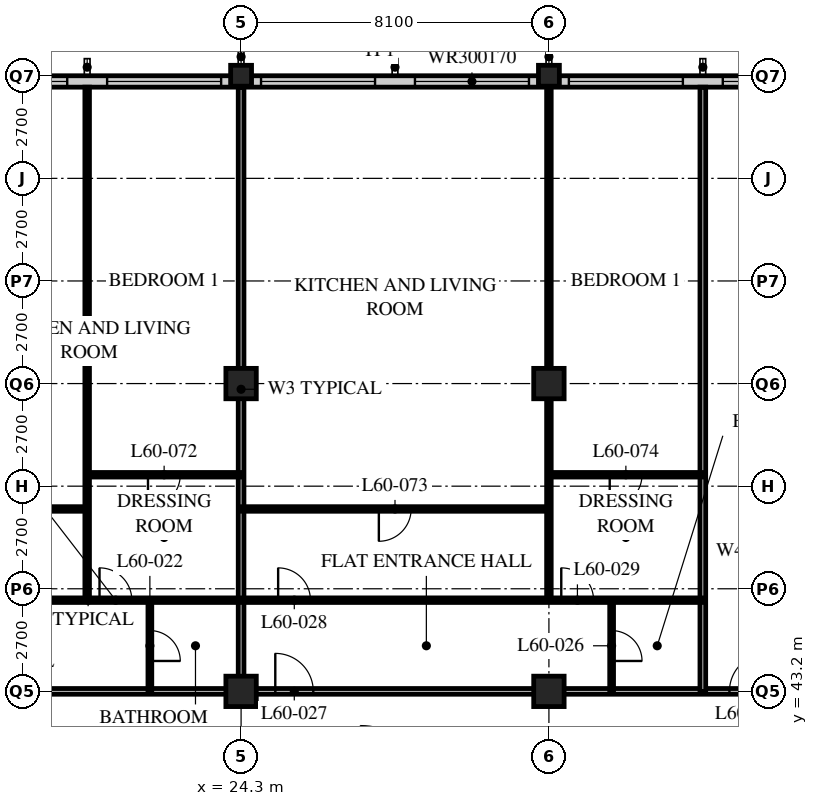
"""IFC4 building model, lengths in metres.
Left out: names, types, materials, properties, quantities, classifications, styles, units other than length and angle.
Written with IfcOpenShell. Run it as: python <this file> out.ifc"""

import sys

from ifc_helpers import new_model, si_unit, direction, frame, frame_2d, origin, origin_2d, place, context, subcontext, project, spatial, rectangle, hollow_rectangle, extrude, element, fill, save


model = new_model("IFC4")
c1 = context("Model", 3, precision=1e-05, world=origin(), true_north=direction((0.0, 1.0)))
c2 = subcontext(c1, "Body", "Model", "MODEL_VIEW")
j1 = project(units=[si_unit("LENGTHUNIT", "METRE"), si_unit("PLANEANGLEUNIT", "RADIAN")], contexts=[c1])
p1 = place(None, origin())
s1 = spatial("IfcSite", under=j1, at=p1, CompositionType="ELEMENT")
p2 = place(p1, origin())
s2 = spatial("IfcBuilding", under=s1, at=p2, CompositionType="ELEMENT")
p3 = place(p2, frame((0.0, 0.0, 231.6)))
s3 = spatial("IfcBuildingStorey", under=s2, at=p3, CompositionType="ELEMENT", Elevation=231.6)
for number, where, z_axis, x_axis in (
    (1, (24.3, 43.2, 0.0), (0.0, 0.0, 1.0), (1.0, 0.0, 0.0)),
    (2, (24.3, 51.3, 0.0), (0.0, 0.0, 1.0), (1.0, 0.0, 0.0)),
):
    element("IfcColumn", number, at=place(p3, frame(where, z_axis=z_axis, x_axis=x_axis)), inside=s3, PredefinedType="COLUMN", context=c2, shape_type="SweptSolid", body=[
        extrude(hollow_rectangle(XDim=0.8, YDim=0.8, WallThickness=0.08, at=origin_2d()), origin(), (0.0, 0.0, 1.0), 3.6),
    ])
p4 = place(p3, frame((24.3, 59.4, 0.0), z_axis=(0.0, 0.0, 1.0), x_axis=(1.0, 0.0, 0.0)))
e3 = element("IfcColumn", 3, at=p4, inside=s3, PredefinedType="COLUMN", context=c2, shape_type="SweptSolid", body=[
    extrude(hollow_rectangle(XDim=0.55, YDim=0.55, WallThickness=0.045, at=origin_2d()), origin(), (0.0, 0.0, 1.0), 3.6),
])
for number, where, z_axis, x_axis in (
    (4, (32.4, 43.2, 0.0), (0.0, 0.0, 1.0), (1.0, 0.0, 0.0)),
    (5, (32.4, 51.3, 0.0), (0.0, 0.0, 1.0), (1.0, 0.0, 0.0)),
):
    element("IfcColumn", number, at=place(p3, frame(where, z_axis=z_axis, x_axis=x_axis)), inside=s3, PredefinedType="COLUMN", context=c2, shape_type="SweptSolid", body=[
        extrude(hollow_rectangle(XDim=0.8, YDim=0.8, WallThickness=0.08, at=origin_2d()), origin(), (0.0, 0.0, 1.0), 3.6),
    ])
p5 = place(p3, frame((32.4, 59.4, 0.0), z_axis=(0.0, 0.0, 1.0), x_axis=(1.0, 0.0, 0.0)))
e6 = element("IfcColumn", 6, at=p5, inside=s3, PredefinedType="COLUMN", context=c2, shape_type="SweptSolid", body=[
    extrude(hollow_rectangle(XDim=0.55, YDim=0.55, WallThickness=0.045, at=origin_2d()), origin(), (0.0, 0.0, 1.0), 3.6),
])
p6 = place(p3, frame((48.3, 59.25, 0.0), z_axis=(0.0, 0.0, 1.0), x_axis=(-1.0, 0.0, 0.0)))
e7 = element("IfcWall", 7, at=p6, inside=s3, PredefinedType="SOLIDWALL", context=c2, shape_type="SweptSolid", body=[
    extrude(rectangle(XDim=40.2, YDim=0.3, at=frame_2d((20.1, 0.0))), origin(), (0.0, 0.0, 1.0), 2.35),
])
p7 = place(p6, frame((0.225, 0.0, 0.6)))
e8 = element("IfcOpeningElement", 8, at=p7, cuts=e7, PredefinedType="OPENING", context=c2, shape_type="SweptSolid", body=[
    extrude(rectangle(XDim=3.0, YDim=1.7, at=frame_2d((1.5, 0.85))), frame((0.0, 0.16, 0.0), z_axis=(0.0, -1.0, 0.0), x_axis=(1.0, 0.0, 0.0)), (0.0, 0.0, 1.0), 0.32),
])
p8 = place(p6, frame((4.275, 0.0, 0.6)))
e9 = element("IfcOpeningElement", 9, at=p8, cuts=e7, PredefinedType="OPENING", context=c2, shape_type="SweptSolid", body=[
    extrude(rectangle(XDim=3.0, YDim=1.7, at=frame_2d((1.5, 0.85))), frame((0.0, 0.16, 0.0), z_axis=(0.0, -1.0, 0.0), x_axis=(1.0, 0.0, 0.0)), (0.0, 0.0, 1.0), 0.32),
])
p9 = place(p6, frame((8.325, 0.0, 0.6)))
e10 = element("IfcOpeningElement", 10, at=p9, cuts=e7, PredefinedType="OPENING", context=c2, shape_type="SweptSolid", body=[
    extrude(rectangle(XDim=3.0, YDim=1.7, at=frame_2d((1.5, 0.85))), frame((0.0, 0.16, 0.0), z_axis=(0.0, -1.0, 0.0), x_axis=(1.0, 0.0, 0.0)), (0.0, 0.0, 1.0), 0.32),
])
p10 = place(p6, frame((12.375, 0.0, 0.6)))
e11 = element("IfcOpeningElement", 11, at=p10, cuts=e7, PredefinedType="OPENING", context=c2, shape_type="SweptSolid", body=[
    extrude(rectangle(XDim=3.0, YDim=1.7, at=frame_2d((1.5, 0.85))), frame((0.0, 0.16, 0.0), z_axis=(0.0, -1.0, 0.0), x_axis=(1.0, 0.0, 0.0)), (0.0, 0.0, 1.0), 0.32),
])
p11 = place(p6, frame((16.425, 0.0, 0.6)))
e12 = element("IfcOpeningElement", 12, at=p11, cuts=e7, PredefinedType="OPENING", context=c2, shape_type="SweptSolid", body=[
    extrude(rectangle(XDim=3.0, YDim=1.7, at=frame_2d((1.5, 0.85))), frame((0.0, 0.16, 0.0), z_axis=(0.0, -1.0, 0.0), x_axis=(1.0, 0.0, 0.0)), (0.0, 0.0, 1.0), 0.32),
])
p12 = place(p6, frame((20.475, 0.0, 0.6)))
e13 = element("IfcOpeningElement", 13, at=p12, cuts=e7, PredefinedType="OPENING", context=c2, shape_type="SweptSolid", body=[
    extrude(rectangle(XDim=3.0, YDim=1.7, at=frame_2d((1.5, 0.85))), frame((0.0, 0.16, 0.0), z_axis=(0.0, -1.0, 0.0), x_axis=(1.0, 0.0, 0.0)), (0.0, 0.0, 1.0), 0.32),
])
p13 = place(p6, frame((24.525, 0.0, 0.6)))
e14 = element("IfcOpeningElement", 14, at=p13, cuts=e7, PredefinedType="OPENING", context=c2, shape_type="SweptSolid", body=[
    extrude(rectangle(XDim=3.0, YDim=1.7, at=frame_2d((1.5, 0.85))), frame((0.0, 0.16, 0.0), z_axis=(0.0, -1.0, 0.0), x_axis=(1.0, 0.0, 0.0)), (0.0, 0.0, 1.0), 0.32),
])
p14 = place(p6, frame((28.575, 0.0, 0.6)))
e15 = element("IfcOpeningElement", 15, at=p14, cuts=e7, PredefinedType="OPENING", context=c2, shape_type="SweptSolid", body=[
    extrude(rectangle(XDim=3.0, YDim=1.7, at=frame_2d((1.5, 0.85))), frame((0.0, 0.16, 0.0), z_axis=(0.0, -1.0, 0.0), x_axis=(1.0, 0.0, 0.0)), (0.0, 0.0, 1.0), 0.32),
])
p15 = place(p6, frame((32.625, 0.0, 0.6)))
e16 = element("IfcOpeningElement", 16, at=p15, cuts=e7, PredefinedType="OPENING", context=c2, shape_type="SweptSolid", body=[
    extrude(rectangle(XDim=3.0, YDim=1.7, at=frame_2d((1.5, 0.85))), frame((0.0, 0.16, 0.0), z_axis=(0.0, -1.0, 0.0), x_axis=(1.0, 0.0, 0.0)), (0.0, 0.0, 1.0), 0.32),
])
p16 = place(p6, frame((36.675, 0.0, 0.6)))
e17 = element("IfcOpeningElement", 17, at=p16, cuts=e7, PredefinedType="OPENING", context=c2, shape_type="SweptSolid", body=[
    extrude(rectangle(XDim=3.0, YDim=1.7, at=frame_2d((1.5, 0.85))), frame((0.0, 0.16, 0.0), z_axis=(0.0, -1.0, 0.0), x_axis=(1.0, 0.0, 0.0)), (0.0, 0.0, 1.0), 0.32),
])
p17 = place(p3, frame((8.1, 43.2, 0.0), z_axis=(0.0, 0.0, 1.0), x_axis=(1.0, 0.0, 0.0)))
e18 = element("IfcWall", 18, at=p17, inside=s3, PredefinedType="PARTITIONING", context=c2, shape_type="SweptSolid", body=[
    extrude(rectangle(XDim=36.45, YDim=0.15, at=frame_2d((18.225, 0.0))), origin(), (0.0, 0.0, 1.0), 2.35),
])
p18 = place(p17, frame((4.45, 0.0, 0.0)))
e19 = element("IfcOpeningElement", 19, at=p18, cuts=e18, PredefinedType="OPENING", context=c2, shape_type="SweptSolid", body=[
    extrude(rectangle(XDim=1.0, YDim=2.1, at=frame_2d((0.5, 1.05))), frame((0.0, 0.085, 0.0), z_axis=(0.0, -1.0, 0.0), x_axis=(1.0, 0.0, 0.0)), (0.0, 0.0, 1.0), 0.17),
])
p19 = place(p17, frame((17.1, 0.0, 0.0)))
e20 = element("IfcOpeningElement", 20, at=p19, cuts=e18, PredefinedType="OPENING", context=c2, shape_type="SweptSolid", body=[
    extrude(rectangle(XDim=1.0, YDim=2.1, at=frame_2d((0.5, 1.05))), frame((0.0, 0.085, 0.0), z_axis=(0.0, -1.0, 0.0), x_axis=(1.0, 0.0, 0.0)), (0.0, 0.0, 1.0), 0.17),
])
p20 = place(p17, frame((29.05, 0.0, 0.0)))
e21 = element("IfcOpeningElement", 21, at=p20, cuts=e18, PredefinedType="OPENING", context=c2, shape_type="SweptSolid", body=[
    extrude(rectangle(XDim=1.0, YDim=2.1, at=frame_2d((0.5, 1.05))), frame((0.0, 0.085, 0.0), z_axis=(0.0, -1.0, 0.0), x_axis=(1.0, 0.0, 0.0)), (0.0, 0.0, 1.0), 0.17),
])
p21 = place(p17, frame((33.925, 0.0, 0.0)))
e22 = element("IfcOpeningElement", 22, at=p21, cuts=e18, PredefinedType="OPENING", context=c2, shape_type="SweptSolid", body=[
    extrude(rectangle(XDim=1.0, YDim=2.1, at=frame_2d((0.5, 1.05))), frame((0.0, 0.085, 0.0), z_axis=(0.0, -1.0, 0.0), x_axis=(1.0, 0.0, 0.0)), (0.0, 0.0, 1.0), 0.17),
])
p22 = place(p17, frame((1.525, 0.0, 0.0)))
e23 = element("IfcOpeningElement", 23, at=p22, cuts=e18, PredefinedType="OPENING", context=c2, shape_type="SweptSolid", body=[
    extrude(rectangle(XDim=1.0, YDim=2.1, at=frame_2d((0.5, 1.05))), frame((0.0, 0.085, 0.0), z_axis=(0.0, -1.0, 0.0), x_axis=(1.0, 0.0, 0.0)), (0.0, 0.0, 1.0), 0.17),
])
p23 = place(p3, frame((21.9, 43.2, 0.0), z_axis=(0.0, 0.0, 1.0), x_axis=(0.0, 1.0, 0.0)))
e24 = element("IfcWall", 24, at=p23, inside=s3, PredefinedType="PARTITIONING", context=c2, shape_type="SweptSolid", body=[
    extrude(rectangle(XDim=2.4, YDim=0.1, at=frame_2d((1.2, 0.0))), origin(), (0.0, 0.0, 1.0), 3.35),
])
p24 = place(p23, frame((0.8, 0.0, 0.0)))
e25 = element("IfcOpeningElement", 25, at=p24, cuts=e24, PredefinedType="OPENING", context=c2, shape_type="SweptSolid", body=[
    extrude(rectangle(XDim=0.8, YDim=2.1, at=frame_2d((0.4, 1.05))), frame((0.0, 0.06, 0.0), z_axis=(0.0, -1.0, 0.0), x_axis=(1.0, 0.0, 0.0)), (0.0, 0.0, 1.0), 0.12),
])
p25 = place(p3, frame((20.25, 45.6, 0.0), z_axis=(0.0, 0.0, 1.0), x_axis=(0.0, 1.0, 0.0)))
e26 = element("IfcWall", 26, at=p25, inside=s3, PredefinedType="PARTITIONING", context=c2, shape_type="SweptSolid", body=[
    extrude(rectangle(XDim=13.5, YDim=0.12, at=frame_2d((6.75, 0.0))), origin(), (0.0, 0.0, 1.0), 3.35),
])
p26 = place(p3, frame((24.3, 43.2, 0.0), z_axis=(0.0, 0.0, 1.0), x_axis=(0.0, 1.0, 0.0)))
e27 = element("IfcWall", 27, at=p26, inside=s3, PredefinedType="PARTITIONING", context=c2, shape_type="SweptSolid", body=[
    extrude(rectangle(XDim=15.9, YDim=0.15, at=frame_2d((7.95, 0.0))), origin(), (0.0, 0.0, 1.0), 2.35),
])
p27 = place(p3, frame((34.05, 43.2, 0.0), z_axis=(0.0, 0.0, 1.0), x_axis=(0.0, 1.0, 0.0)))
e28 = element("IfcWall", 28, at=p27, inside=s3, PredefinedType="PARTITIONING", context=c2, shape_type="SweptSolid", body=[
    extrude(rectangle(XDim=2.4, YDim=0.1, at=frame_2d((1.2, 0.0))), origin(), (0.0, 0.0, 1.0), 3.35),
])
p28 = place(p27, frame((0.8, 0.0, 0.0)))
e29 = element("IfcOpeningElement", 29, at=p28, cuts=e28, PredefinedType="OPENING", context=c2, shape_type="SweptSolid", body=[
    extrude(rectangle(XDim=0.8, YDim=2.1, at=frame_2d((0.4, 1.05))), frame((0.0, 0.06, 0.0), z_axis=(0.0, -1.0, 0.0), x_axis=(1.0, 0.0, 0.0)), (0.0, 0.0, 1.0), 0.12),
])
p29 = place(p3, frame((32.4, 45.6, 0.0), z_axis=(0.0, 0.0, 1.0), x_axis=(0.0, 1.0, 0.0)))
e30 = element("IfcWall", 30, at=p29, inside=s3, PredefinedType="PARTITIONING", context=c2, shape_type="SweptSolid", body=[
    extrude(rectangle(XDim=13.5, YDim=0.12, at=frame_2d((6.75, 0.0))), origin(), (0.0, 0.0, 1.0), 2.35),
])
p30 = place(p3, frame((36.45, 43.2, 0.0), z_axis=(0.0, 0.0, 1.0), x_axis=(0.0, 1.0, 0.0)))
e31 = element("IfcWall", 31, at=p30, inside=s3, PredefinedType="PARTITIONING", context=c2, shape_type="SweptSolid", body=[
    extrude(rectangle(XDim=15.9, YDim=0.15, at=frame_2d((7.95, 0.0))), origin(), (0.0, 0.0, 1.0), 3.35),
])
p31 = place(p3, frame((4.1, 45.6, 0.0), z_axis=(0.0, 0.0, 1.0), x_axis=(1.0, 0.0, 0.0)))
e32 = element("IfcWall", 32, at=p31, inside=s3, PredefinedType="PARTITIONING", context=c2, shape_type="SweptSolid", body=[
    extrude(rectangle(XDim=32.35, YDim=0.12, at=frame_2d((16.175, 0.0))), origin(), (0.0, 0.0, 1.0), 3.35),
])
p32 = place(p31, frame((9.025, 0.0, 0.0)))
e33 = element("IfcOpeningElement", 33, at=p32, cuts=e32, PredefinedType="OPENING", context=c2, shape_type="SweptSolid", body=[
    extrude(rectangle(XDim=0.85, YDim=2.1, at=frame_2d((0.425, 1.05))), frame((0.0, 0.07, 0.0), z_axis=(0.0, -1.0, 0.0), x_axis=(1.0, 0.0, 0.0)), (0.0, 0.0, 1.0), 0.14),
])
p33 = place(p31, frame((16.475, 0.0, 0.0)))
e34 = element("IfcOpeningElement", 34, at=p33, cuts=e32, PredefinedType="OPENING", context=c2, shape_type="SweptSolid", body=[
    extrude(rectangle(XDim=0.85, YDim=2.1, at=frame_2d((0.425, 1.05))), frame((0.0, 0.07, 0.0), z_axis=(0.0, -1.0, 0.0), x_axis=(1.0, 0.0, 0.0)), (0.0, 0.0, 1.0), 0.14),
])
p34 = place(p31, frame((21.175, 0.0, 0.0)))
e35 = element("IfcOpeningElement", 35, at=p34, cuts=e32, PredefinedType="OPENING", context=c2, shape_type="SweptSolid", body=[
    extrude(rectangle(XDim=0.85, YDim=2.1, at=frame_2d((0.425, 1.05))), frame((0.0, 0.07, 0.0), z_axis=(0.0, -1.0, 0.0), x_axis=(1.0, 0.0, 0.0)), (0.0, 0.0, 1.0), 0.14),
])
p35 = place(p31, frame((28.625, 0.0, 0.0)))
e36 = element("IfcOpeningElement", 36, at=p35, cuts=e32, PredefinedType="OPENING", context=c2, shape_type="SweptSolid", body=[
    extrude(rectangle(XDim=0.85, YDim=2.1, at=frame_2d((0.425, 1.05))), frame((0.0, 0.07, 0.0), z_axis=(0.0, -1.0, 0.0), x_axis=(1.0, 0.0, 0.0)), (0.0, 0.0, 1.0), 0.14),
])
p36 = place(p31, frame((6.725, 0.0, 0.0)))
e37 = element("IfcOpeningElement", 37, at=p36, cuts=e32, PredefinedType="OPENING", context=c2, shape_type="SweptSolid", body=[
    extrude(rectangle(XDim=0.85, YDim=2.1, at=frame_2d((0.425, 1.05))), frame((0.0, 0.07, 0.0), z_axis=(0.0, -1.0, 0.0), x_axis=(1.0, 0.0, 0.0)), (0.0, 0.0, 1.0), 0.14),
])
p37 = place(p31, frame((2.875, 0.0, 0.0)))
e38 = element("IfcOpeningElement", 38, at=p37, cuts=e32, PredefinedType="OPENING", context=c2, shape_type="SweptSolid", body=[
    extrude(rectangle(XDim=0.85, YDim=2.1, at=frame_2d((0.425, 1.05))), frame((0.0, 0.07, 0.0), z_axis=(0.0, -1.0, 0.0), x_axis=(1.0, 0.0, 0.0)), (0.0, 0.0, 1.0), 0.14),
])
p38 = place(p3, frame((12.15, 48.0, 0.0), z_axis=(0.0, 0.0, 1.0), x_axis=(1.0, 0.0, 0.0)))
e39 = element("IfcWall", 39, at=p38, inside=s3, PredefinedType="PARTITIONING", context=c2, shape_type="SweptSolid", body=[
    extrude(rectangle(XDim=8.1, YDim=0.12, at=frame_2d((4.05, 0.0))), origin(), (0.0, 0.0, 1.0), 3.35),
])
p39 = place(p38, frame((3.625, 0.0, 0.0)))
e40 = element("IfcOpeningElement", 40, at=p39, cuts=e39, PredefinedType="OPENING", context=c2, shape_type="SweptSolid", body=[
    extrude(rectangle(XDim=0.85, YDim=2.1, at=frame_2d((0.425, 1.05))), frame((0.0, 0.07, 0.0), z_axis=(0.0, -1.0, 0.0), x_axis=(1.0, 0.0, 0.0)), (0.0, 0.0, 1.0), 0.14),
])
p40 = place(p3, frame((20.25, 48.9, 0.0), z_axis=(0.0, 0.0, 1.0), x_axis=(1.0, 0.0, 0.0)))
e41 = element("IfcWall", 41, at=p40, inside=s3, PredefinedType="PARTITIONING", context=c2, shape_type="SweptSolid", body=[
    extrude(rectangle(XDim=4.05, YDim=0.12, at=frame_2d((2.025, 0.0))), origin(), (0.0, 0.0, 1.0), 3.35),
])
p41 = place(p40, frame((1.6, 0.0, 0.0)))
e42 = element("IfcOpeningElement", 42, at=p41, cuts=e41, PredefinedType="OPENING", context=c2, shape_type="SweptSolid", body=[
    extrude(rectangle(XDim=0.85, YDim=2.1, at=frame_2d((0.425, 1.05))), frame((0.0, 0.07, 0.0), z_axis=(0.0, -1.0, 0.0), x_axis=(1.0, 0.0, 0.0)), (0.0, 0.0, 1.0), 0.14),
])
p42 = place(p3, frame((24.3, 48.0, 0.0), z_axis=(0.0, 0.0, 1.0), x_axis=(1.0, 0.0, 0.0)))
e43 = element("IfcWall", 43, at=p42, inside=s3, PredefinedType="PARTITIONING", context=c2, shape_type="SweptSolid", body=[
    extrude(rectangle(XDim=8.1, YDim=0.12, at=frame_2d((4.05, 0.0))), origin(), (0.0, 0.0, 1.0), 3.35),
])
p43 = place(p42, frame((3.625, 0.0, 0.0)))
e44 = element("IfcOpeningElement", 44, at=p43, cuts=e43, PredefinedType="OPENING", context=c2, shape_type="SweptSolid", body=[
    extrude(rectangle(XDim=0.85, YDim=2.1, at=frame_2d((0.425, 1.05))), frame((0.0, 0.07, 0.0), z_axis=(0.0, -1.0, 0.0), x_axis=(1.0, 0.0, 0.0)), (0.0, 0.0, 1.0), 0.14),
])
p44 = place(p3, frame((32.4, 48.9, 0.0), z_axis=(0.0, 0.0, 1.0), x_axis=(1.0, 0.0, 0.0)))
e45 = element("IfcWall", 45, at=p44, inside=s3, PredefinedType="PARTITIONING", context=c2, shape_type="SweptSolid", body=[
    extrude(rectangle(XDim=4.05, YDim=0.12, at=frame_2d((2.025, 0.0))), origin(), (0.0, 0.0, 1.0), 3.35),
])
p45 = place(p44, frame((1.6, 0.0, 0.0)))
e46 = element("IfcOpeningElement", 46, at=p45, cuts=e45, PredefinedType="OPENING", context=c2, shape_type="SweptSolid", body=[
    extrude(rectangle(XDim=0.85, YDim=2.1, at=frame_2d((0.425, 1.05))), frame((0.0, 0.07, 0.0), z_axis=(0.0, -1.0, 0.0), x_axis=(1.0, 0.0, 0.0)), (0.0, 0.0, 1.0), 0.14),
])
p46 = place(p9, origin())
e47 = element("IfcWindow", 47, at=p46, inside=s3, PartitioningType="SINGLE_PANEL", PredefinedType="WINDOW", context=c2, shape_type="SweptSolid", body=[
    extrude(rectangle(XDim=3.0, YDim=1.7, at=frame_2d((1.5, 0.85))), frame((0.0, 0.03, 0.0), z_axis=(0.0, -1.0, 0.0), x_axis=(1.0, 0.0, 0.0)), (0.0, 0.0, 1.0), 0.06),
])
fill(e10, e47)
p47 = place(p10, origin())
e48 = element("IfcWindow", 48, at=p47, inside=s3, PartitioningType="SINGLE_PANEL", PredefinedType="WINDOW", context=c2, shape_type="SweptSolid", body=[
    extrude(rectangle(XDim=3.0, YDim=1.7, at=frame_2d((1.5, 0.85))), frame((0.0, 0.03, 0.0), z_axis=(0.0, -1.0, 0.0), x_axis=(1.0, 0.0, 0.0)), (0.0, 0.0, 1.0), 0.06),
])
fill(e11, e48)
p48 = place(p11, origin())
e49 = element("IfcWindow", 49, at=p48, inside=s3, PartitioningType="SINGLE_PANEL", PredefinedType="WINDOW", context=c2, shape_type="SweptSolid", body=[
    extrude(rectangle(XDim=3.0, YDim=1.7, at=frame_2d((1.5, 0.85))), frame((0.0, 0.03, 0.0), z_axis=(0.0, -1.0, 0.0), x_axis=(1.0, 0.0, 0.0)), (0.0, 0.0, 1.0), 0.06),
])
fill(e12, e49)
p49 = place(p12, origin())
e50 = element("IfcWindow", 50, at=p49, inside=s3, PartitioningType="SINGLE_PANEL", PredefinedType="WINDOW", context=c2, shape_type="SweptSolid", body=[
    extrude(rectangle(XDim=3.0, YDim=1.7, at=frame_2d((1.5, 0.85))), frame((0.0, 0.03, 0.0), z_axis=(0.0, -1.0, 0.0), x_axis=(1.0, 0.0, 0.0)), (0.0, 0.0, 1.0), 0.06),
])
fill(e13, e50)
p50 = place(p13, origin())
e51 = element("IfcWindow", 51, at=p50, inside=s3, PartitioningType="SINGLE_PANEL", PredefinedType="WINDOW", context=c2, shape_type="SweptSolid", body=[
    extrude(rectangle(XDim=3.0, YDim=1.7, at=frame_2d((1.5, 0.85))), frame((0.0, 0.03, 0.0), z_axis=(0.0, -1.0, 0.0), x_axis=(1.0, 0.0, 0.0)), (0.0, 0.0, 1.0), 0.06),
])
fill(e14, e51)
p51 = place(p14, origin())
e52 = element("IfcWindow", 52, at=p51, inside=s3, PartitioningType="SINGLE_PANEL", PredefinedType="WINDOW", context=c2, shape_type="SweptSolid", body=[
    extrude(rectangle(XDim=3.0, YDim=1.7, at=frame_2d((1.5, 0.85))), frame((0.0, 0.03, 0.0), z_axis=(0.0, -1.0, 0.0), x_axis=(1.0, 0.0, 0.0)), (0.0, 0.0, 1.0), 0.06),
])
fill(e15, e52)
p52 = place(p24, origin())
e53 = element("IfcDoor", 53, at=p52, inside=s3, OperationType="SINGLE_SWING_RIGHT", PredefinedType="DOOR", context=c2, shape_type="SweptSolid", body=[
    extrude(rectangle(XDim=0.8, YDim=2.1, at=frame_2d((0.4, 1.05))), frame((0.0, 0.025, 0.0), z_axis=(0.0, -1.0, 0.0), x_axis=(1.0, 0.0, 0.0)), (0.0, 0.0, 1.0), 0.05),
])
fill(e25, e53)
p53 = place(p33, origin())
e54 = element("IfcDoor", 54, at=p53, inside=s3, OperationType="SINGLE_SWING_LEFT", PredefinedType="DOOR", context=c2, shape_type="SweptSolid", body=[
    extrude(rectangle(XDim=0.85, YDim=2.1, at=frame_2d((0.425, 1.05))), frame((0.0, 0.025, 0.0), z_axis=(0.0, -1.0, 0.0), x_axis=(1.0, 0.0, 0.0)), (0.0, 0.0, 1.0), 0.05),
])
fill(e34, e54)
p54 = place(p28, origin())
e55 = element("IfcDoor", 55, at=p54, inside=s3, OperationType="SINGLE_SWING_RIGHT", PredefinedType="DOOR", context=c2, shape_type="SweptSolid", body=[
    extrude(rectangle(XDim=0.8, YDim=2.1, at=frame_2d((0.4, 1.05))), frame((0.0, 0.025, 0.0), z_axis=(0.0, -1.0, 0.0), x_axis=(1.0, 0.0, 0.0)), (0.0, 0.0, 1.0), 0.05),
])
fill(e29, e55)
p55 = place(p19, origin())
e56 = element("IfcDoor", 56, at=p55, inside=s3, OperationType="SINGLE_SWING_LEFT", PredefinedType="DOOR", context=c2, shape_type="SweptSolid", body=[
    extrude(rectangle(XDim=1.0, YDim=2.1, at=frame_2d((0.5, 1.05))), frame((0.0, 0.025, 0.0), z_axis=(0.0, -1.0, 0.0), x_axis=(1.0, 0.0, 0.0)), (0.0, 0.0, 1.0), 0.05),
])
fill(e20, e56)
p56 = place(p34, origin())
e57 = element("IfcDoor", 57, at=p56, inside=s3, OperationType="SINGLE_SWING_LEFT", PredefinedType="DOOR", context=c2, shape_type="SweptSolid", body=[
    extrude(rectangle(XDim=0.85, YDim=2.1, at=frame_2d((0.425, 1.05))), frame((0.0, 0.025, 0.0), z_axis=(0.0, -1.0, 0.0), x_axis=(1.0, 0.0, 0.0)), (0.0, 0.0, 1.0), 0.05),
])
fill(e35, e57)
p57 = place(p35, origin())
e58 = element("IfcDoor", 58, at=p57, inside=s3, OperationType="SINGLE_SWING_LEFT", PredefinedType="DOOR", context=c2, shape_type="SweptSolid", body=[
    extrude(rectangle(XDim=0.85, YDim=2.1, at=frame_2d((0.425, 1.05))), frame((0.0, 0.025, 0.0), z_axis=(0.0, -1.0, 0.0), x_axis=(1.0, 0.0, 0.0)), (0.0, 0.0, 1.0), 0.05),
])
fill(e36, e58)
p58 = place(p20, origin())
e59 = element("IfcDoor", 59, at=p58, inside=s3, OperationType="SINGLE_SWING_RIGHT", PredefinedType="DOOR", context=c2, shape_type="SweptSolid", body=[
    extrude(rectangle(XDim=1.0, YDim=2.1, at=frame_2d((0.5, 1.05))), frame((0.0, 0.025, 0.0), z_axis=(0.0, -1.0, 0.0), x_axis=(1.0, 0.0, 0.0)), (0.0, 0.0, 1.0), 0.05),
])
fill(e21, e59)
p59 = place(p41, origin())
e60 = element("IfcDoor", 60, at=p59, inside=s3, OperationType="SINGLE_SWING_RIGHT", PredefinedType="DOOR", context=c2, shape_type="SweptSolid", body=[
    extrude(rectangle(XDim=0.85, YDim=2.1, at=frame_2d((0.425, 1.05))), frame((0.0, 0.025, 0.0), z_axis=(0.0, -1.0, 0.0), x_axis=(1.0, 0.0, 0.0)), (0.0, 0.0, 1.0), 0.05),
])
fill(e42, e60)
p60 = place(p43, origin())
e61 = element("IfcDoor", 61, at=p60, inside=s3, OperationType="SINGLE_SWING_RIGHT", PredefinedType="DOOR", context=c2, shape_type="SweptSolid", body=[
    extrude(rectangle(XDim=0.85, YDim=2.1, at=frame_2d((0.425, 1.05))), frame((0.0, 0.025, 0.0), z_axis=(0.0, -1.0, 0.0), x_axis=(1.0, 0.0, 0.0)), (0.0, 0.0, 1.0), 0.05),
])
fill(e44, e61)
p61 = place(p45, origin())
e62 = element("IfcDoor", 62, at=p61, inside=s3, OperationType="SINGLE_SWING_RIGHT", PredefinedType="DOOR", context=c2, shape_type="SweptSolid", body=[
    extrude(rectangle(XDim=0.85, YDim=2.1, at=frame_2d((0.425, 1.05))), frame((0.0, 0.025, 0.0), z_axis=(0.0, -1.0, 0.0), x_axis=(1.0, 0.0, 0.0)), (0.0, 0.0, 1.0), 0.05),
])
fill(e46, e62)
save(model, sys.argv[1])
